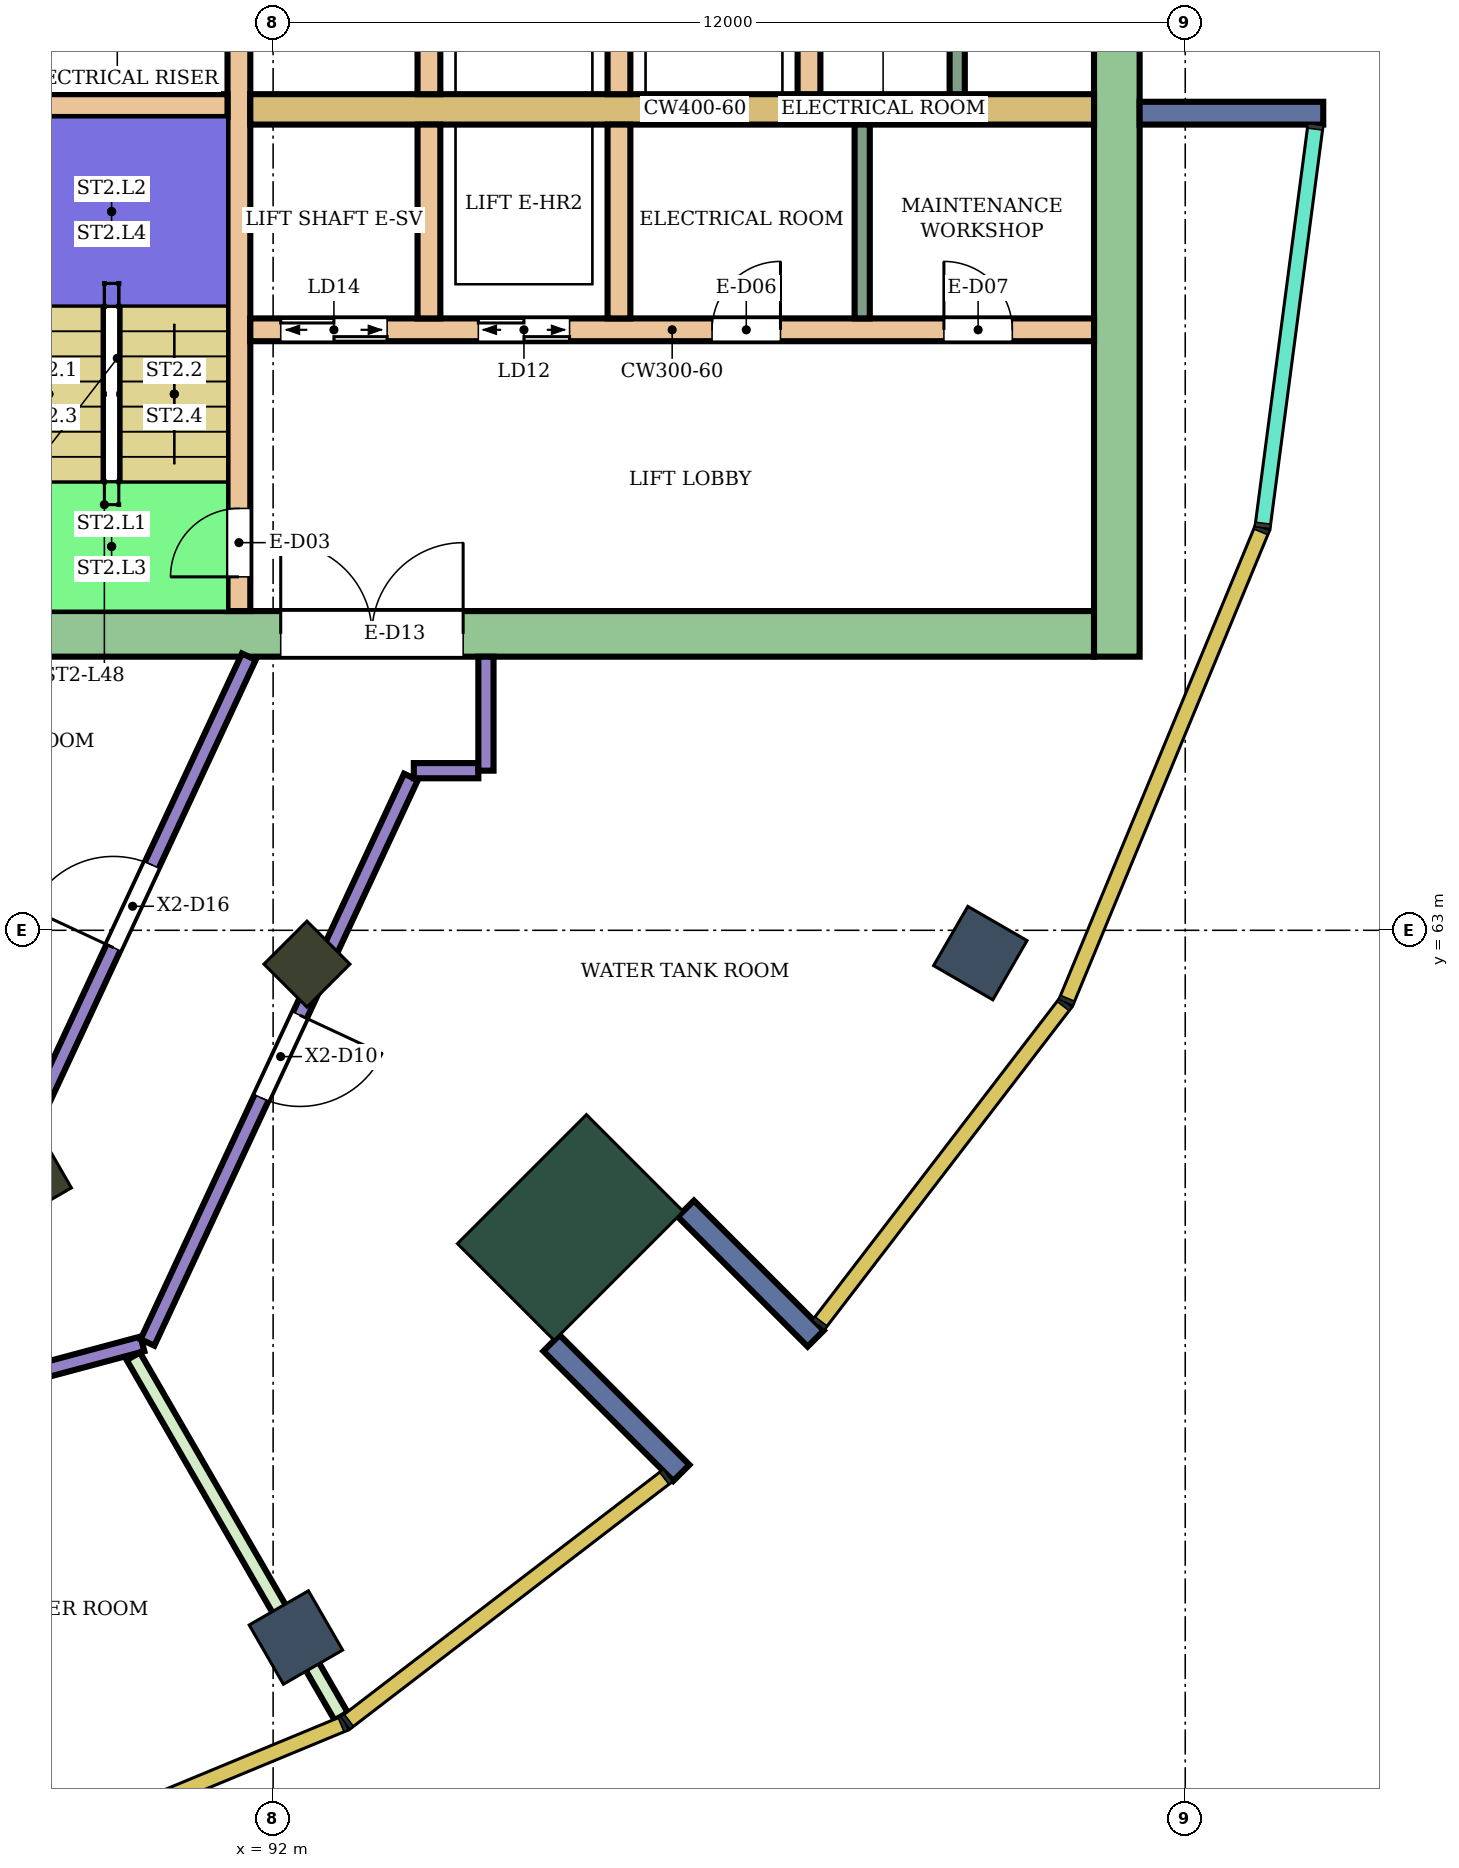
"""IFC4 building model, lengths in metres.
Left out: names, types, materials, properties, quantities, classifications, styles, units other than length and angle.
Written with IfcOpenShell. Run it as: python <this file> out.ifc"""

import sys

from ifc_helpers import new_model, si_unit, direction, frame, frame_2d, origin, origin_2d, place, context, subcontext, project, spatial, rectangle, extrude, element, fill, save


model = new_model("IFC4")
c1 = context("Model", 3, precision=1e-05, world=origin(), true_north=direction((0.0, 1.0)))
c2 = subcontext(c1, "Body", "Model", "MODEL_VIEW")
j1 = project(units=[si_unit("LENGTHUNIT", "METRE"), si_unit("PLANEANGLEUNIT", "RADIAN")], contexts=[c1])
p1 = place(None, origin())
s1 = spatial("IfcSite", under=j1, at=p1, CompositionType="ELEMENT")
p2 = place(p1, origin())
s2 = spatial("IfcBuilding", under=s1, at=p2, CompositionType="ELEMENT")
p3 = place(p2, frame((0.0, 0.0, 206.9)))
s3 = spatial("IfcBuildingStorey", under=s2, at=p3, CompositionType="ELEMENT", Elevation=206.9)
for number, where, z_axis, x_axis in (
    (1, (92.3, 53.696, 0.0), (0.0, 0.0, 1.0), (0.5, -0.866, 0.0)),
    (2, (101.304, 62.7, 0.0), (0.0, 0.0, 1.0), (0.866, -0.5, 0.0)),
):
    element("IfcColumn", number, at=place(p3, frame(where, z_axis=z_axis, x_axis=x_axis)), inside=s3, PredefinedType="COLUMN", context=c2, shape_type="SweptSolid", body=[
        extrude(rectangle(XDim=0.9, YDim=0.9, at=origin_2d()), origin(), (0.0, 0.0, 1.0), 5.6),
    ])
for number, where, z_axis, x_axis in (
    (3, (88.8, 59.758, 0.0), (0.0, 0.0, 1.0), (0.5, -0.866, 0.0)),
    (4, (92.445, 62.555, 0.0), (0.0, 0.0, 1.0), (0.707, -0.707, 0.0)),
):
    element("IfcColumn", number, at=place(p3, frame(where, z_axis=z_axis, x_axis=x_axis)), inside=s3, PredefinedType="COLUMN", context=c2, shape_type="SweptSolid", body=[
        extrude(rectangle(XDim=0.8, YDim=0.8, at=origin_2d()), origin(), (0.0, 0.0, 1.0), 5.6),
    ])
p4 = place(p3, frame((95.91, 59.09, 0.0), z_axis=(0.0, 0.0, 1.0), x_axis=(0.707106781187, -0.707106781187, 0.0)))
e5 = element("IfcColumn", 5, at=p4, inside=s3, PredefinedType="COLUMN", context=c2, shape_type="SweptSolid", body=[
    extrude(rectangle(XDim=1.8, YDim=2.4, at=origin_2d()), origin(), (0.0, 0.0, 1.0), 5.6),
])
p5 = place(p3, frame((87.9, 66.9, 0.0), z_axis=(0.0, 0.0, 1.0), x_axis=(1.0, 0.0, 0.0)))
e6 = element("IfcWall", 6, at=p5, inside=s3, PredefinedType="SHEAR", context=c2, shape_type="SweptSolid", body=[
    extrude(rectangle(XDim=14.9, YDim=0.6, at=frame_2d((7.45, 0.0))), origin(), (0.0, 0.0, 1.0), 5.28),
])
p6 = place(p5, frame((4.2, 0.0, 0.0)))
e7 = element("IfcOpeningElement", 7, at=p6, cuts=e6, PredefinedType="OPENING", context=c2, shape_type="SweptSolid", body=[
    extrude(rectangle(XDim=2.4, YDim=2.4, at=frame_2d((1.2, 1.2))), frame((0.0, 0.31, 0.0), z_axis=(0.0, -1.0, 0.0), x_axis=(1.0, 0.0, 0.0)), (0.0, 0.0, 1.0), 0.62),
])
p7 = place(p3, frame((103.1, 66.6, 0.0), z_axis=(0.0, 0.0, 1.0), x_axis=(0.0, 1.0, 0.0)))
e8 = element("IfcWall", 8, at=p7, inside=s3, PredefinedType="SHEAR", context=c2, shape_type="SweptSolid", body=[
    extrude(rectangle(XDim=16.8, YDim=0.6, at=frame_2d((8.4, 0.0))), origin(), (0.0, 0.0, 1.0), 5.28),
])
p8 = place(p3, frame((91.55, 67.2, 0.0), z_axis=(0.0, 0.0, 1.0), x_axis=(0.0, 1.0, 0.0)))
e9 = element("IfcWall", 9, at=p8, inside=s3, PredefinedType="SHEAR", context=c2, shape_type="SweptSolid", body=[
    extrude(rectangle(XDim=7.8, YDim=0.3, at=frame_2d((3.9, 0.0))), origin(), (0.0, 0.0, 1.0), 5.28),
])
p9 = place(p8, frame((0.45, 0.0, 0.0)))
e10 = element("IfcOpeningElement", 10, at=p9, cuts=e9, PredefinedType="OPENING", context=c2, shape_type="SweptSolid", body=[
    extrude(rectangle(XDim=0.9, YDim=2.1, at=frame_2d((0.45, 1.05))), frame((0.0, 0.16, 0.0), z_axis=(0.0, -1.0, 0.0), x_axis=(1.0, 0.0, 0.0)), (0.0, 0.0, 1.0), 0.32),
])
p10 = place(p3, frame((88.35, 73.85, 0.0), z_axis=(0.0, 0.0, 1.0), x_axis=(1.0, 0.0, 0.0)))
e11 = element("IfcWall", 11, at=p10, inside=s3, PredefinedType="SHEAR", context=c2, shape_type="SweptSolid", body=[
    extrude(rectangle(XDim=3.05, YDim=0.3, at=frame_2d((1.525, 0.0))), origin(), (0.0, 0.0, 1.0), 5.28),
])
p11 = place(p3, frame((91.7, 73.8, 0.0), z_axis=(0.0, 0.0, 1.0), x_axis=(1.0, 0.0, 0.0)))
e12 = element("IfcWall", 12, at=p11, inside=s3, PredefinedType="SHEAR", context=c2, shape_type="SweptSolid", body=[
    extrude(rectangle(XDim=11.1, YDim=0.4, at=frame_2d((5.55, 0.0))), origin(), (0.0, 0.0, 1.0), 5.28),
])
p12 = place(p3, frame((91.7, 70.9, 0.0), z_axis=(0.0, 0.0, 1.0), x_axis=(1.0, 0.0, 0.0)))
e13 = element("IfcWall", 13, at=p12, inside=s3, PredefinedType="SHEAR", context=c2, shape_type="SweptSolid", body=[
    extrude(rectangle(XDim=11.1, YDim=0.3, at=frame_2d((5.55, 0.0))), origin(), (0.0, 0.0, 1.0), 5.28),
])
p13 = place(p12, frame((0.4, 0.0, 0.0)))
e14 = element("IfcOpeningElement", 14, at=p13, cuts=e13, PredefinedType="OPENING", context=c2, shape_type="SweptSolid", body=[
    extrude(rectangle(XDim=1.4, YDim=2.1, at=frame_2d((0.7, 1.05))), frame((0.0, 0.16, 0.0), z_axis=(0.0, -1.0, 0.0), x_axis=(1.0, 0.0, 0.0)), (0.0, 0.0, 1.0), 0.32),
])
p14 = place(p12, frame((3.0, 0.0, 0.0)))
e15 = element("IfcOpeningElement", 15, at=p14, cuts=e13, PredefinedType="OPENING", context=c2, shape_type="SweptSolid", body=[
    extrude(rectangle(XDim=1.2, YDim=2.1, at=frame_2d((0.6, 1.05))), frame((0.0, 0.16, 0.0), z_axis=(0.0, -1.0, 0.0), x_axis=(1.0, 0.0, 0.0)), (0.0, 0.0, 1.0), 0.32),
])
p15 = place(p12, frame((6.075, 0.0, 0.0)))
e16 = element("IfcOpeningElement", 16, at=p15, cuts=e13, PredefinedType="OPENING", context=c2, shape_type="SweptSolid", body=[
    extrude(rectangle(XDim=0.9, YDim=2.1, at=frame_2d((0.45, 1.05))), frame((0.0, 0.16, 0.0), z_axis=(0.0, -1.0, 0.0), x_axis=(1.0, 0.0, 0.0)), (0.0, 0.0, 1.0), 0.32),
])
p16 = place(p12, frame((9.125, 0.0, 0.0)))
e17 = element("IfcOpeningElement", 17, at=p16, cuts=e13, PredefinedType="OPENING", context=c2, shape_type="SweptSolid", body=[
    extrude(rectangle(XDim=0.9, YDim=2.1, at=frame_2d((0.45, 1.05))), frame((0.0, 0.16, 0.0), z_axis=(0.0, -1.0, 0.0), x_axis=(1.0, 0.0, 0.0)), (0.0, 0.0, 1.0), 0.32),
])
for number, where, z_axis, x_axis in (
    (18, (94.05, 74.0, 0.0), (0.0, 0.0, 1.0), (0.0, 1.0, 0.0)),
    (19, (96.55, 74.0, 0.0), (0.0, 0.0, 1.0), (0.0, 1.0, 0.0)),
    (20, (99.05, 74.0, 0.0), (0.0, 0.0, 1.0), (0.0, 1.0, 0.0)),
    (21, (94.05, 71.05, 0.0), (0.0, 0.0, 1.0), (0.0, 1.0, 0.0)),
    (22, (96.55, 71.05, 0.0), (0.0, 0.0, 1.0), (0.0, 1.0, 0.0)),
):
    element("IfcWall", number, at=place(p3, frame(where, z_axis=z_axis, x_axis=x_axis)), inside=s3, PredefinedType="SHEAR", context=c2, shape_type="SweptSolid", body=[
        extrude(rectangle(XDim=2.55, YDim=0.3, at=frame_2d((1.275, 0.0))), origin(), (0.0, 0.0, 1.0), 5.28),
    ])
for number, where, z_axis, x_axis in (
    (23, (103.4, 73.75, 0.0), (0.0, 0.0, 1.0), (1.0, 0.0, 0.0)),
    (24, (95.662, 57.57, 0.0), (0.0, 0.0, 1.0), (0.707, -0.707, 0.0)),
    (25, (97.43, 59.338, 0.0), (0.0, 0.0, 1.0), (0.707, -0.707, 0.0)),
):
    element("IfcWall", number, at=place(p3, frame(where, z_axis=z_axis, x_axis=x_axis)), inside=s3, PredefinedType="NOTDEFINED", context=c2, shape_type="SweptSolid", body=[
        extrude(rectangle(XDim=2.416, YDim=0.3, at=frame_2d((1.208, 0.0))), origin(), (0.0, 0.0, 1.0), 5.6),
    ])
p17 = place(p3, frame((80.0, 54.804, 0.0), z_axis=(0.0, 0.0, 1.0), x_axis=(0.965920507456, 0.258838894444, 0.0)))
e26 = element("IfcWall", 26, at=p17, inside=s3, PredefinedType="PARTITIONING", context=c2, shape_type="SweptSolid", body=[
    extrude(rectangle(XDim=10.643, YDim=0.2, at=frame_2d((5.322, 0.0))), origin(), (0.0, 0.0, 1.0), 5.15),
])
p18 = place(p17, frame((7.241, 0.0, 0.0)))
e27 = element("IfcOpeningElement", 27, at=p18, cuts=e26, PredefinedType="OPENING", context=c2, shape_type="SweptSolid", body=[
    extrude(rectangle(XDim=1.2, YDim=2.4, at=frame_2d((0.6, 1.2))), frame((0.0, 0.11, 0.0), z_axis=(0.0, -1.0, 0.0), x_axis=(1.0, 0.0, 0.0)), (0.0, 0.0, 1.0), 0.22),
])
p19 = place(p3, frame((88.502, 59.774, 0.0), z_axis=(0.0, 0.0, 1.0), x_axis=(0.422164659646, 0.906519167004, 0.0)))
e28 = element("IfcWall", 28, at=p19, inside=s3, PredefinedType="PARTITIONING", context=c2, shape_type="SweptSolid", body=[
    extrude(rectangle(XDim=7.53, YDim=0.2, at=frame_2d((3.765, 0.0))), origin(), (0.0, 0.0, 1.0), 5.15),
])
p20 = place(p19, frame((3.308, 0.0, 0.0)))
e29 = element("IfcOpeningElement", 29, at=p20, cuts=e28, PredefinedType="OPENING", context=c2, shape_type="SweptSolid", body=[
    extrude(rectangle(XDim=1.2, YDim=2.4, at=frame_2d((0.6, 1.2))), frame((0.0, 0.11, 0.0), z_axis=(0.0, -1.0, 0.0), x_axis=(1.0, 0.0, 0.0)), (0.0, 0.0, 1.0), 0.22),
])
p21 = place(p3, frame((90.161, 57.396, 0.0), z_axis=(0.0, 0.0, 1.0), x_axis=(0.499911747244, -0.866076350542, 0.0)))
e30 = element("IfcWall", 30, at=p21, inside=s3, PredefinedType="PARTITIONING", context=c2, shape_type="SweptSolid", body=[
    extrude(rectangle(XDim=5.471, YDim=0.2, at=frame_2d((2.735, 0.0))), origin(), (0.0, 0.0, 1.0), 4.667),
])
p22 = place(p3, frame((90.347, 57.577, 0.0), z_axis=(0.0, 0.0, 1.0), x_axis=(0.422271497137, 0.906469405278, 0.0)))
e31 = element("IfcWall", 31, at=p22, inside=s3, PredefinedType="PARTITIONING", context=c2, shape_type="SweptSolid", body=[
    extrude(rectangle(XDim=8.208, YDim=0.2, at=frame_2d((4.104, 0.0))), origin(), (0.0, 0.0, 1.0), 5.15),
])
p23 = place(p22, frame((3.549, 0.0, 0.0)))
e32 = element("IfcOpeningElement", 32, at=p23, cuts=e31, PredefinedType="OPENING", context=c2, shape_type="SweptSolid", body=[
    extrude(rectangle(XDim=1.2, YDim=2.4, at=frame_2d((0.6, 1.2))), frame((0.0, 0.11, 0.0), z_axis=(0.0, -1.0, 0.0), x_axis=(1.0, 0.0, 0.0)), (0.0, 0.0, 1.0), 0.22),
])
p24 = place(p3, frame((93.851, 65.1, 0.0), z_axis=(0.0, 0.0, 1.0), x_axis=(1.0, 0.0, 0.0)))
e33 = element("IfcWall", 33, at=p24, inside=s3, PredefinedType="PARTITIONING", context=c2, shape_type="SweptSolid", body=[
    extrude(rectangle(XDim=0.849, YDim=0.2, at=frame_2d((0.424, 0.0))), origin(), (0.0, 0.0, 1.0), 5.15),
])
p25 = place(p3, frame((94.8, 65.1, 0.0), z_axis=(0.0, 0.0, 1.0), x_axis=(0.0, 1.0, 0.0)))
e34 = element("IfcWall", 34, at=p25, inside=s3, PredefinedType="PARTITIONING", context=c2, shape_type="SweptSolid", body=[
    extrude(rectangle(XDim=1.499, YDim=0.2, at=frame_2d((0.75, 0.0))), origin(), (0.0, 0.0, 1.0), 5.15),
])
for number, where, z_axis, x_axis in (
    (35, (101.0, 74.0, 0.0), (0.0, 0.0, 1.0), (0.0, 1.0, 0.0)),
    (36, (99.75, 71.05, 0.0), (0.0, 0.0, 1.0), (0.0, 1.0, 0.0)),
):
    element("IfcWall", number, at=place(p3, frame(where, z_axis=z_axis, x_axis=x_axis)), inside=s3, PredefinedType="PARTITIONING", context=c2, shape_type="SweptSolid", body=[
        extrude(rectangle(XDim=2.55, YDim=0.2, at=frame_2d((1.275, 0.0))), origin(), (0.0, 0.0, 1.0), 5.28),
    ])
p26 = place(p23, frame((1.2, 0.0, 0.0), z_axis=(0.0, 0.0, 1.0), x_axis=(-1.0, 0.0, 0.0)))
e37 = element("IfcDoor", 37, at=p26, inside=s3, OperationType="SINGLE_SWING_LEFT", PredefinedType="DOOR", context=c2, shape_type="SweptSolid", body=[
    extrude(rectangle(XDim=1.2, YDim=2.4, at=frame_2d((0.6, 1.2))), frame((0.0, 0.025, 0.0), z_axis=(0.0, -1.0, 0.0), x_axis=(1.0, 0.0, 0.0)), (0.0, 0.0, 1.0), 0.05),
])
fill(e32, e37)
p27 = place(p20, origin())
e38 = element("IfcDoor", 38, at=p27, inside=s3, OperationType="SINGLE_SWING_LEFT", PredefinedType="DOOR", context=c2, shape_type="SweptSolid", body=[
    extrude(rectangle(XDim=1.2, YDim=2.4, at=frame_2d((0.6, 1.2))), frame((0.0, 0.025, 0.0), z_axis=(0.0, -1.0, 0.0), x_axis=(1.0, 0.0, 0.0)), (0.0, 0.0, 1.0), 0.05),
])
fill(e29, e38)
p28 = place(p9, origin())
e39 = element("IfcDoor", 39, at=p28, inside=s3, OperationType="SINGLE_SWING_LEFT", PredefinedType="DOOR", context=c2, shape_type="SweptSolid", body=[
    extrude(rectangle(XDim=0.9, YDim=2.1, at=frame_2d((0.45, 1.05))), frame((0.0, 0.025, 0.0), z_axis=(0.0, -1.0, 0.0), x_axis=(1.0, 0.0, 0.0)), (0.0, 0.0, 1.0), 0.05),
])
fill(e10, e39)
p29 = place(p13, origin())
e40 = element("IfcDoor", 40, at=p29, inside=s3, OperationType="DOUBLE_DOOR_SLIDING", PredefinedType="DOOR", context=c2, shape_type="SweptSolid", body=[
    extrude(rectangle(XDim=1.4, YDim=2.1, at=frame_2d((0.7, 1.05))), frame((0.0, 0.025, 0.0), z_axis=(0.0, -1.0, 0.0), x_axis=(1.0, 0.0, 0.0)), (0.0, 0.0, 1.0), 0.05),
])
fill(e14, e40)
p30 = place(p14, origin())
e41 = element("IfcDoor", 41, at=p30, inside=s3, OperationType="DOUBLE_DOOR_SLIDING", PredefinedType="DOOR", context=c2, shape_type="SweptSolid", body=[
    extrude(rectangle(XDim=1.2, YDim=2.1, at=frame_2d((0.6, 1.05))), frame((0.0, 0.025, 0.0), z_axis=(0.0, -1.0, 0.0), x_axis=(1.0, 0.0, 0.0)), (0.0, 0.0, 1.0), 0.05),
])
fill(e15, e41)
p31 = place(p15, origin())
e42 = element("IfcDoor", 42, at=p31, inside=s3, OperationType="SINGLE_SWING_RIGHT", PredefinedType="DOOR", context=c2, shape_type="SweptSolid", body=[
    extrude(rectangle(XDim=0.9, YDim=2.1, at=frame_2d((0.45, 1.05))), frame((0.0, 0.025, 0.0), z_axis=(0.0, -1.0, 0.0), x_axis=(1.0, 0.0, 0.0)), (0.0, 0.0, 1.0), 0.05),
])
fill(e16, e42)
p32 = place(p16, origin())
e43 = element("IfcDoor", 43, at=p32, inside=s3, OperationType="SINGLE_SWING_LEFT", PredefinedType="DOOR", context=c2, shape_type="SweptSolid", body=[
    extrude(rectangle(XDim=0.9, YDim=2.1, at=frame_2d((0.45, 1.05))), frame((0.0, 0.025, 0.0), z_axis=(0.0, -1.0, 0.0), x_axis=(1.0, 0.0, 0.0)), (0.0, 0.0, 1.0), 0.05),
])
fill(e17, e43)
p33 = place(p6, origin())
e44 = element("IfcDoor", 44, at=p33, inside=s3, OperationType="DOUBLE_DOOR_SINGLE_SWING", PredefinedType="DOOR", context=c2, shape_type="SweptSolid", body=[
    extrude(rectangle(XDim=2.4, YDim=2.4, at=frame_2d((1.2, 1.2))), frame((0.0, 0.025, 0.0), z_axis=(0.0, -1.0, 0.0), x_axis=(1.0, 0.0, 0.0)), (0.0, 0.0, 1.0), 0.05),
])
fill(e7, e44)
save(model, sys.argv[1])
